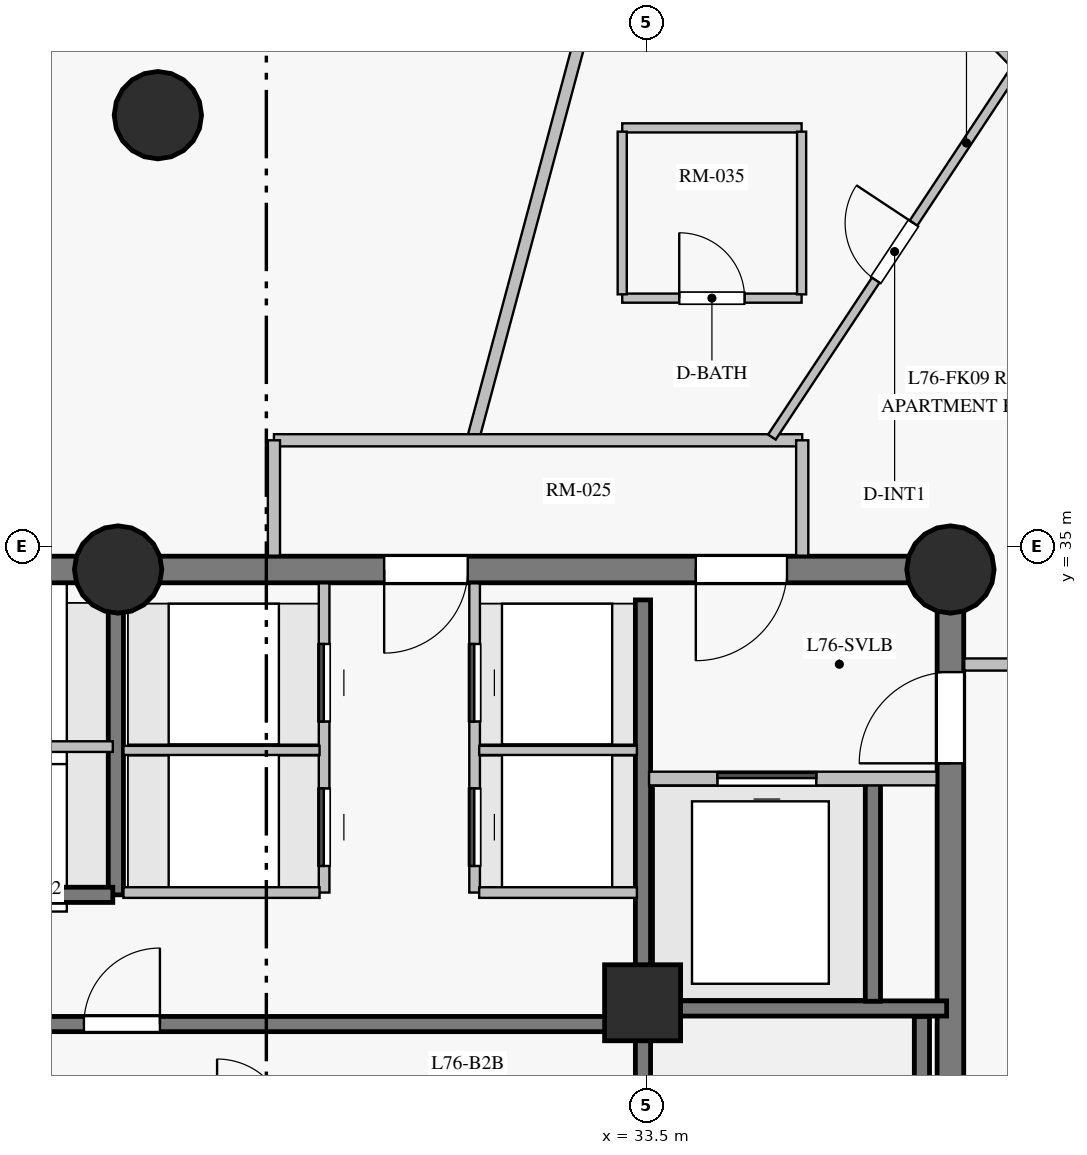
"""IFC4 building model, lengths in metres.
Left out: names, types, materials, properties, quantities, classifications, styles, units other than length and angle.
Written with IfcOpenShell. Run it as: python <this file> out.ifc"""

import sys

from ifc_helpers import new_model, si_unit, direction, frame, frame_2d, origin, origin_with_axes, origin_2d, place, context, subcontext, project, spatial, rectangle, circle, extrude, source, transform, mapped, element, fill, save


model = new_model("IFC4")
c1 = context("Model", 3, precision=1e-05, world=origin(), true_north=direction((0.0, 1.0)))
c2 = subcontext(c1, "Body", "Model", "MODEL_VIEW")
j1 = project(units=[si_unit("LENGTHUNIT", "METRE"), si_unit("PLANEANGLEUNIT", "RADIAN")], contexts=[c1])
p1 = place(None, origin())
s1 = spatial("IfcSite", under=j1, at=p1, CompositionType="ELEMENT")
p2 = place(p1, origin())
s2 = spatial("IfcBuilding", under=s1, at=p2, CompositionType="ELEMENT")
p3 = place(p2, frame((0.0, 0.0, 256.55)))
s3 = spatial("IfcBuildingStorey", under=s2, at=p3, CompositionType="ELEMENT", Elevation=256.55)
p4 = place(p3, frame((37.5, 18.3, 0.0), z_axis=(0.0, 0.0, 1.0), x_axis=(0.0, 1.0, 0.0)))
e1 = element("IfcWall", 1, at=p4, inside=s3, PredefinedType="SHEAR", context=c2, shape_type="SweptSolid", body=[
    extrude(rectangle(XDim=16.4, YDim=0.35, at=frame_2d((8.2, 0.0))), origin(), (0.0, 0.0, 1.0), 2.85),
])
p5 = place(p4, frame((13.85, 0.0, 0.0)))
e2 = element("IfcOpeningElement", 2, at=p5, cuts=e1, PredefinedType="OPENING", context=c2, shape_type="SweptSolid", body=[
    extrude(rectangle(XDim=1.2, YDim=2.15, at=frame_2d((0.6, 1.075))), frame((0.0, 0.185, 0.0), z_axis=(0.0, -1.0, 0.0), x_axis=(1.0, 0.0, 0.0)), (0.0, 0.0, 1.0), 0.37),
])
p6 = place(p3, frame((37.5, 34.7, 0.0), z_axis=(0.0, 0.0, 1.0), x_axis=(-1.0, 0.0, 0.0)))
e3 = element("IfcWall", 3, at=p6, inside=s3, PredefinedType="SHEAR", context=c2, shape_type="SweptSolid", body=[
    extrude(rectangle(XDim=10.95, YDim=0.35, at=frame_2d((5.475, 0.0))), origin(), (0.0, 0.0, 1.0), 2.85),
])
p7 = place(p6, frame((2.15, 0.0, 0.0)))
e4 = element("IfcOpeningElement", 4, at=p7, cuts=e3, PredefinedType="OPENING", context=c2, shape_type="SweptSolid", body=[
    extrude(rectangle(XDim=1.2, YDim=2.15, at=frame_2d((0.6, 1.075))), frame((0.0, 0.185, 0.0), z_axis=(0.0, -1.0, 0.0), x_axis=(1.0, 0.0, 0.0)), (0.0, 0.0, 1.0), 0.37),
])
p8 = place(p6, frame((6.35, 0.0, 0.0)))
e5 = element("IfcOpeningElement", 5, at=p8, cuts=e3, PredefinedType="OPENING", context=c2, shape_type="SweptSolid", body=[
    extrude(rectangle(XDim=1.1, YDim=2.15, at=frame_2d((0.55, 1.075))), frame((0.0, 0.185, 0.0), z_axis=(0.0, -1.0, 0.0), x_axis=(1.0, 0.0, 0.0)), (0.0, 0.0, 1.0), 0.37),
])
p9 = place(p3, frame((26.55, 34.7, 0.0), z_axis=(0.0, 0.0, 1.0), x_axis=(-1.0, 0.0, 0.0)))
e6 = element("IfcWall", 6, at=p9, inside=s3, PredefinedType="SHEAR", context=c2, shape_type="SweptSolid", body=[
    extrude(rectangle(XDim=7.05, YDim=0.35, at=frame_2d((3.525, 0.0))), origin(), (0.0, 0.0, 1.0), 2.85),
])
m1 = source(origin_with_axes(), c2, "Body", "SweptSolid", [
    extrude(circle(Radius=0.575, at=origin_2d()), origin(), (0.0, 0.0, 1.0), 3.05),
])
for number, where, z_axis, x_axis in (
    (7, (26.55, 34.7, 0.0), (0.0, 0.0, 1.0), (1.0, 0.0, 0.0)),
    (8, (37.5, 34.7, 0.0), (0.0, 0.0, 1.0), (1.0, 0.0, 0.0)),
):
    element("IfcColumn", number, at=place(p3, frame(where, z_axis=z_axis, x_axis=x_axis)), inside=s3, PredefinedType="COLUMN", context=c2, shape_type="MappedRepresentation", body=[
        mapped(m1, transform((0.0, 0.0, 0.0), scale=1.0)),
    ])
m2 = source(origin_with_axes(), c2, "Body", "SweptSolid", [
    extrude(rectangle(XDim=1.0, YDim=1.0, at=origin_2d()), origin(), (0.0, 0.0, 1.0), 3.05),
])
p10 = place(p3, frame((33.45, 29.0, 0.0), z_axis=(0.0, 0.0, 1.0), x_axis=(1.0, 0.0, 0.0)))
e9 = element("IfcColumn", 9, at=p10, inside=s3, PredefinedType="COLUMN", context=c2, shape_type="MappedRepresentation", body=[
    mapped(m2, transform((0.0, 0.0, 0.0), scale=1.0)),
])
p11 = place(p3, frame((27.073, 40.677, 0.0), z_axis=(0.0, 0.0, 1.0), x_axis=(1.0, 0.0, 0.0)))
e10 = element("IfcColumn", 10, at=p11, inside=s3, PredefinedType="COLUMN", context=c2, shape_type="MappedRepresentation", body=[
    mapped(m1, transform((0.0, 0.0, 0.0), scale=1.0)),
])
p12 = place(p3, frame((41.9, 37.822, 0.0), z_axis=(0.0, 0.0, 1.0), x_axis=(-0.698260952417, 0.715843308504, 0.0)))
e11 = element("IfcWall", 11, at=p12, inside=s3, PredefinedType="SOLIDWALL", context=c2, shape_type="SweptSolid", body=[
    extrude(rectangle(XDim=10.72, YDim=0.28, at=frame_2d((5.36, 0.0))), origin(), (0.0, 0.0, 1.0), 2.85),
])
p13 = place(p12, frame((1.723, 0.0, 0.85)))
e12 = element("IfcOpeningElement", 12, at=p13, cuts=e11, PredefinedType="OPENING", context=c2, shape_type="SweptSolid", body=[
    extrude(rectangle(XDim=1.6, YDim=1.6, at=frame_2d((0.8, 0.8))), frame((0.0, 0.15, 0.0), z_axis=(0.0, -1.0, 0.0), x_axis=(1.0, 0.0, 0.0)), (0.0, 0.0, 1.0), 0.3),
])
p14 = place(p12, frame((7.003, 0.0, 0.85)))
e13 = element("IfcOpeningElement", 13, at=p14, cuts=e11, PredefinedType="OPENING", context=c2, shape_type="SweptSolid", body=[
    extrude(rectangle(XDim=1.6, YDim=1.6, at=frame_2d((0.8, 0.8))), frame((0.0, 0.15, 0.0), z_axis=(0.0, -1.0, 0.0), x_axis=(1.0, 0.0, 0.0)), (0.0, 0.0, 1.0), 0.3),
])
p15 = place(p3, frame((33.455, 18.7, 0.0), z_axis=(0.0, 0.0, 1.0), x_axis=(0.0, 1.0, 0.0)))
e14 = element("IfcWall", 14, at=p15, inside=s3, PredefinedType="SHEAR", context=c2, shape_type="SweptSolid", body=[
    extrude(rectangle(XDim=15.6, YDim=0.2, at=frame_2d((7.8, 0.0))), origin(), (0.0, 0.0, 1.0), 2.85),
])
p16 = place(p15, frame((2.75, 0.0, 0.0)))
e15 = element("IfcOpeningElement", 15, at=p16, cuts=e14, PredefinedType="OPENING", context=c2, shape_type="SweptSolid", body=[
    extrude(rectangle(XDim=1.15, YDim=2.15, at=frame_2d((0.575, 1.075))), frame((0.0, 0.11, 0.0), z_axis=(0.0, -1.0, 0.0), x_axis=(1.0, 0.0, 0.0)), (0.0, 0.0, 1.0), 0.22),
])
p17 = place(p15, frame((0.55, 0.0, 0.0)))
e16 = element("IfcOpeningElement", 16, at=p17, cuts=e14, PredefinedType="OPENING", context=c2, shape_type="SweptSolid", body=[
    extrude(rectangle(XDim=0.94, YDim=2.1, at=frame_2d((0.47, 1.05))), frame((0.0, 0.11, 0.0), z_axis=(0.0, -1.0, 0.0), x_axis=(1.0, 0.0, 0.0)), (0.0, 0.0, 1.0), 0.22),
])
p18 = place(p3, frame((23.7, 28.72, 0.0), z_axis=(0.0, 0.0, 1.0), x_axis=(1.0, 0.0, 0.0)))
e17 = element("IfcWall", 17, at=p18, inside=s3, PredefinedType="SHEAR", context=c2, shape_type="SweptSolid", body=[
    extrude(rectangle(XDim=9.6, YDim=0.2, at=frame_2d((4.8, 0.0))), origin(), (0.0, 0.0, 1.0), 2.85),
])
p19 = place(p18, frame((2.4, 0.0, 0.0)))
e18 = element("IfcOpeningElement", 18, at=p19, cuts=e17, PredefinedType="OPENING", context=c2, shape_type="SweptSolid", body=[
    extrude(rectangle(XDim=1.0, YDim=2.15, at=frame_2d((0.5, 1.075))), frame((0.0, 0.11, 0.0), z_axis=(0.0, -1.0, 0.0), x_axis=(1.0, 0.0, 0.0)), (0.0, 0.0, 1.0), 0.22),
])
p20 = place(p3, frame((37.125, 21.32, 0.0), z_axis=(0.0, 0.0, 1.0), x_axis=(0.0, 1.0, 0.0)))
e19 = element("IfcWall", 19, at=p20, inside=s3, PredefinedType="SHEAR", context=c2, shape_type="SweptSolid", body=[
    extrude(rectangle(XDim=7.5, YDim=0.2, at=frame_2d((3.75, 0.0))), origin(), (0.0, 0.0, 1.0), 2.85),
])
p21 = place(p3, frame((33.455, 28.925, 0.0), z_axis=(0.0, 0.0, 1.0), x_axis=(1.0, 0.0, 0.0)))
e20 = element("IfcWall", 20, at=p21, inside=s3, PredefinedType="SHEAR", context=c2, shape_type="SweptSolid", body=[
    extrude(rectangle(XDim=3.995, YDim=0.2, at=frame_2d((1.998, 0.0))), origin(), (0.0, 0.0, 1.0), 2.85),
])
p22 = place(p3, frame((26.52, 30.42, 0.0), z_axis=(0.0, 0.0, 1.0), x_axis=(0.0, 1.0, 0.0)))
e21 = element("IfcWall", 21, at=p22, inside=s3, PredefinedType="SHEAR", context=c2, shape_type="SweptSolid", body=[
    extrude(rectangle(XDim=3.86, YDim=0.2, at=frame_2d((1.93, 0.0))), origin(), (0.0, 0.0, 1.0), 2.85),
])
p23 = place(p3, frame((36.48, 29.02, 0.0), z_axis=(0.0, 0.0, 1.0), x_axis=(0.0, 1.0, 0.0)))
e22 = element("IfcWall", 22, at=p23, inside=s3, PredefinedType="SHEAR", context=c2, shape_type="SweptSolid", body=[
    extrude(rectangle(XDim=2.86, YDim=0.2, at=frame_2d((1.43, 0.0))), origin(), (0.0, 0.0, 1.0), 2.85),
])
p24 = place(p3, frame((23.7, 30.42, 0.0), z_axis=(0.0, 0.0, 1.0), x_axis=(1.0, 0.0, 0.0)))
e23 = element("IfcWall", 23, at=p24, inside=s3, PredefinedType="SHEAR", context=c2, shape_type="SweptSolid", body=[
    extrude(rectangle(XDim=2.78, YDim=0.2, at=frame_2d((1.39, 0.0))), origin(), (0.0, 0.0, 1.0), 2.85),
])
p25 = place(p3, frame((31.207, 36.371, 0.0), z_axis=(0.0, 0.0, 1.0), x_axis=(0.258815637699, 0.965926739294, 0.0)))
e24 = element("IfcWall", 24, at=p25, inside=s3, PredefinedType="PARTITIONING", context=c2, shape_type="SweptSolid", body=[
    extrude(rectangle(XDim=9.408, YDim=0.16, at=frame_2d((4.704, 0.0))), origin(), (0.0, 0.0, 1.0), 2.85),
])
p26 = place(p3, frame((28.6, 36.4, 0.0), z_axis=(0.0, 0.0, 1.0), x_axis=(1.0, 0.0, 0.0)))
e25 = element("IfcWall", 25, at=p26, inside=s3, PredefinedType="PARTITIONING", context=c2, shape_type="SweptSolid", body=[
    extrude(rectangle(XDim=6.95, YDim=0.16, at=frame_2d((3.475, 0.0))), origin(), (0.0, 0.0, 1.0), 2.45),
])
p27 = place(p3, frame((35.151, 36.442, 0.0), z_axis=(0.0, 0.0, 1.0), x_axis=(0.551852093065, 0.833942004806, 0.0)))
e26 = element("IfcWall", 26, at=p27, inside=s3, PredefinedType="PARTITIONING", context=c2, shape_type="SweptSolid", body=[
    extrude(rectangle(XDim=5.902, YDim=0.12, at=frame_2d((2.951, 0.0))), origin(), (0.0, 0.0, 1.0), 2.85),
])
p28 = place(p27, frame((2.476, 0.0, 0.0)))
e27 = element("IfcOpeningElement", 27, at=p28, cuts=e26, PredefinedType="OPENING", context=c2, shape_type="SweptSolid", body=[
    extrude(rectangle(XDim=0.9, YDim=2.1, at=frame_2d((0.45, 1.05))), frame((0.0, 0.07, 0.0), z_axis=(0.0, -1.0, 0.0), x_axis=(1.0, 0.0, 0.0)), (0.0, 0.0, 1.0), 0.14),
])
p29 = place(p3, frame((37.682, 33.45, 0.0), z_axis=(0.0, 0.0, 1.0), x_axis=(1.0, 0.0, 0.0)))
e28 = element("IfcWall", 28, at=p29, inside=s3, PredefinedType="PARTITIONING", context=c2, shape_type="SweptSolid", body=[
    extrude(rectangle(XDim=4.118, YDim=0.16, at=frame_2d((2.059, 0.0))), origin(), (0.0, 0.0, 1.0), 2.85),
])
p30 = place(p29, frame((0.733, 0.0, 0.0)))
e29 = element("IfcOpeningElement", 29, at=p30, cuts=e28, PredefinedType="OPENING", context=c2, shape_type="SweptSolid", body=[
    extrude(rectangle(XDim=0.96, YDim=2.15, at=frame_2d((0.48, 1.075))), frame((0.0, 0.09, 0.0), z_axis=(0.0, -1.0, 0.0), x_axis=(1.0, 0.0, 0.0)), (0.0, 0.0, 1.0), 0.18),
])
p31 = place(p3, frame((29.26, 30.45, 0.0), z_axis=(0.0, 0.0, 1.0), x_axis=(0.0, 1.0, 0.0)))
e30 = element("IfcWall", 30, at=p31, inside=s3, PredefinedType="PARTITIONING", context=c2, shape_type="SweptSolid", body=[
    extrude(rectangle(XDim=4.068, YDim=0.14, at=frame_2d((2.034, 0.0))), origin(), (0.0, 0.0, 1.0), 2.85),
])
p32 = place(p31, frame((0.35, 0.0, 0.0)))
e31 = element("IfcOpeningElement", 31, at=p32, cuts=e30, PredefinedType="OPENING", context=c2, shape_type="SweptSolid", body=[
    extrude(rectangle(XDim=1.02, YDim=2.15, at=frame_2d((0.51, 1.075))), frame((0.0, 0.08, 0.0), z_axis=(0.0, -1.0, 0.0), x_axis=(1.0, 0.0, 0.0)), (0.0, 0.0, 1.0), 0.16),
])
p33 = place(p31, frame((2.25, 0.0, 0.0)))
e32 = element("IfcOpeningElement", 32, at=p33, cuts=e30, PredefinedType="OPENING", context=c2, shape_type="SweptSolid", body=[
    extrude(rectangle(XDim=1.02, YDim=2.15, at=frame_2d((0.51, 1.075))), frame((0.0, 0.08, 0.0), z_axis=(0.0, -1.0, 0.0), x_axis=(1.0, 0.0, 0.0)), (0.0, 0.0, 1.0), 0.16),
])
p34 = place(p3, frame((31.24, 30.45, 0.0), z_axis=(0.0, 0.0, 1.0), x_axis=(0.0, 1.0, 0.0)))
e33 = element("IfcWall", 33, at=p34, inside=s3, PredefinedType="PARTITIONING", context=c2, shape_type="SweptSolid", body=[
    extrude(rectangle(XDim=4.068, YDim=0.14, at=frame_2d((2.034, 0.0))), origin(), (0.0, 0.0, 1.0), 2.85),
])
p35 = place(p34, frame((0.35, 0.0, 0.0)))
e34 = element("IfcOpeningElement", 34, at=p35, cuts=e33, PredefinedType="OPENING", context=c2, shape_type="SweptSolid", body=[
    extrude(rectangle(XDim=1.02, YDim=2.15, at=frame_2d((0.51, 1.075))), frame((0.0, 0.08, 0.0), z_axis=(0.0, -1.0, 0.0), x_axis=(1.0, 0.0, 0.0)), (0.0, 0.0, 1.0), 0.16),
])
p36 = place(p34, frame((2.25, 0.0, 0.0)))
e35 = element("IfcOpeningElement", 35, at=p36, cuts=e33, PredefinedType="OPENING", context=c2, shape_type="SweptSolid", body=[
    extrude(rectangle(XDim=1.02, YDim=2.15, at=frame_2d((0.51, 1.075))), frame((0.0, 0.08, 0.0), z_axis=(0.0, -1.0, 0.0), x_axis=(1.0, 0.0, 0.0)), (0.0, 0.0, 1.0), 0.16),
])
p37 = place(p3, frame((33.535, 31.95, 0.0), z_axis=(0.0, 0.0, 1.0), x_axis=(1.0, 0.0, 0.0)))
e36 = element("IfcWall", 36, at=p37, inside=s3, PredefinedType="PARTITIONING", context=c2, shape_type="SweptSolid", body=[
    extrude(rectangle(XDim=3.784, YDim=0.18, at=frame_2d((1.892, 0.0))), origin(), (0.0, 0.0, 1.0), 2.85),
])
p38 = place(p37, frame((0.9, 0.0, 0.0)))
e37 = element("IfcOpeningElement", 37, at=p38, cuts=e36, PredefinedType="OPENING", context=c2, shape_type="SweptSolid", body=[
    extrude(rectangle(XDim=1.3, YDim=2.2, at=frame_2d((0.65, 1.1))), frame((0.0, 0.1, 0.0), z_axis=(0.0, -1.0, 0.0), x_axis=(1.0, 0.0, 0.0)), (0.0, 0.0, 1.0), 0.2),
])
p39 = place(p3, frame((23.652, 32.37, 0.0), z_axis=(0.0, 0.0, 1.0), x_axis=(1.0, 0.0, 0.0)))
e38 = element("IfcWall", 38, at=p39, inside=s3, PredefinedType="PARTITIONING", context=c2, shape_type="SweptSolid", body=[
    extrude(rectangle(XDim=2.828, YDim=0.14, at=frame_2d((1.414, 0.0))), origin(), (0.0, 0.0, 1.0), 2.85),
])
p40 = place(p3, frame((26.62, 30.45, 0.0), z_axis=(0.0, 0.0, 1.0), x_axis=(1.0, 0.0, 0.0)))
e39 = element("IfcWall", 39, at=p40, inside=s3, PredefinedType="PARTITIONING", context=c2, shape_type="SweptSolid", body=[
    extrude(rectangle(XDim=2.58, YDim=0.14, at=frame_2d((1.29, 0.0))), origin(), (0.0, 0.0, 1.0), 2.85),
])
p41 = place(p3, frame((26.62, 32.32, 0.0), z_axis=(0.0, 0.0, 1.0), x_axis=(1.0, 0.0, 0.0)))
e40 = element("IfcWall", 40, at=p41, inside=s3, PredefinedType="PARTITIONING", context=c2, shape_type="SweptSolid", body=[
    extrude(rectangle(XDim=2.58, YDim=0.12, at=frame_2d((1.29, 0.0))), origin(), (0.0, 0.0, 1.0), 2.85),
])
p42 = place(p3, frame((33.182, 38.27, 0.0), z_axis=(0.0, 0.0, 1.0), x_axis=(1.0, 0.0, 0.0)))
e41 = element("IfcWall", 41, at=p42, inside=s3, PredefinedType="PARTITIONING", context=c2, shape_type="SweptSolid", body=[
    extrude(rectangle(XDim=2.36, YDim=0.12, at=frame_2d((1.18, 0.0))), origin(), (0.0, 0.0, 1.0), 2.3),
])
p43 = place(p42, frame((0.75, 0.0, 0.0)))
e42 = element("IfcOpeningElement", 42, at=p43, cuts=e41, PredefinedType="OPENING", context=c2, shape_type="SweptSolid", body=[
    extrude(rectangle(XDim=0.86, YDim=2.1, at=frame_2d((0.43, 1.05))), frame((0.0, 0.07, 0.0), z_axis=(0.0, -1.0, 0.0), x_axis=(1.0, 0.0, 0.0)), (0.0, 0.0, 1.0), 0.14),
])
p44 = place(p3, frame((35.542, 40.51, 0.0), z_axis=(0.0, 0.0, 1.0), x_axis=(-1.0, 0.0, 0.0)))
e43 = element("IfcWall", 43, at=p44, inside=s3, PredefinedType="PARTITIONING", context=c2, shape_type="SweptSolid", body=[
    extrude(rectangle(XDim=2.36, YDim=0.12, at=frame_2d((1.18, 0.0))), origin(), (0.0, 0.0, 1.0), 2.85),
])
for number, where, z_axis, x_axis in (
    (44, (35.542, 38.32, 0.0), (0.0, 0.0, 1.0), (0.0, 1.0, 0.0)),
    (45, (33.182, 40.46, 0.0), (0.0, 0.0, 1.0), (0.0, -1.0, 0.0)),
):
    element("IfcWall", number, at=place(p3, frame(where, z_axis=z_axis, x_axis=x_axis)), inside=s3, PredefinedType="PARTITIONING", context=c2, shape_type="SweptSolid", body=[
        extrude(rectangle(XDim=2.14, YDim=0.12, at=frame_2d((1.07, 0.0))), origin(), (0.0, 0.0, 1.0), 2.85),
    ])
p45 = place(p3, frame((31.3, 30.45, 0.0), z_axis=(0.0, 0.0, 1.0), x_axis=(1.0, 0.0, 0.0)))
e46 = element("IfcWall", 46, at=p45, inside=s3, PredefinedType="PARTITIONING", context=c2, shape_type="SweptSolid", body=[
    extrude(rectangle(XDim=2.075, YDim=0.14, at=frame_2d((1.038, 0.0))), origin(), (0.0, 0.0, 1.0), 2.85),
])
p46 = place(p3, frame((31.3, 32.32, 0.0), z_axis=(0.0, 0.0, 1.0), x_axis=(1.0, 0.0, 0.0)))
e47 = element("IfcWall", 47, at=p46, inside=s3, PredefinedType="PARTITIONING", context=c2, shape_type="SweptSolid", body=[
    extrude(rectangle(XDim=2.075, YDim=0.12, at=frame_2d((1.038, 0.0))), origin(), (0.0, 0.0, 1.0), 2.85),
])
for number, where, z_axis, x_axis in (
    (48, (28.6, 34.882, 0.0), (0.0, 0.0, 1.0), (0.0, 1.0, 0.0)),
    (49, (35.55, 36.4, 0.0), (0.0, 0.0, 1.0), (0.0, -1.0, 0.0)),
):
    element("IfcWall", number, at=place(p3, frame(where, z_axis=z_axis, x_axis=x_axis)), inside=s3, PredefinedType="PARTITIONING", context=c2, shape_type="SweptSolid", body=[
        extrude(rectangle(XDim=1.518, YDim=0.16, at=frame_2d((0.759, 0.0))), origin(), (0.0, 0.0, 1.0), 2.85),
    ])
m3 = source(origin_with_axes(), c2, "Body", "SweptSolid", [
    extrude(rectangle(XDim=1.2, YDim=2.15, at=frame_2d((0.6, 1.075))), frame((0.0, 0.025, 0.0), z_axis=(0.0, -1.0, 0.0), x_axis=(1.0, 0.0, 0.0)), (0.0, 0.0, 1.0), 0.05),
])
p47 = place(p5, origin())
e50 = element("IfcDoor", 50, at=p47, inside=s3, OperationType="SINGLE_SWING_LEFT", PredefinedType="DOOR", context=c2, shape_type="MappedRepresentation", body=[
    mapped(m3, transform((0.0, 0.0, 0.0), scale=1.0)),
])
fill(e2, e50)
p48 = place(p7, origin())
e51 = element("IfcDoor", 51, at=p48, inside=s3, OperationType="SINGLE_SWING_RIGHT", PredefinedType="DOOR", context=c2, shape_type="MappedRepresentation", body=[
    mapped(m3, transform((0.0, 0.0, 0.0), scale=1.0)),
])
fill(e4, e51)
m4 = source(origin_with_axes(), c2, "Body", "SweptSolid", [
    extrude(rectangle(XDim=1.3, YDim=2.2, at=frame_2d((0.65, 1.1))), frame((0.0, 0.025, 0.0), z_axis=(0.0, -1.0, 0.0), x_axis=(1.0, 0.0, 0.0)), (0.0, 0.0, 1.0), 0.05),
])
p49 = place(p38, origin())
e52 = element("IfcDoor", 52, at=p49, inside=s3, OperationType="SLIDING_TO_LEFT", PredefinedType="DOOR", context=c2, shape_type="MappedRepresentation", body=[
    mapped(m4, transform((0.0, 0.0, 0.0), scale=1.0)),
])
fill(e37, e52)
m5 = source(origin_with_axes(), c2, "Body", "SweptSolid", [
    extrude(rectangle(XDim=1.0, YDim=2.15, at=frame_2d((0.5, 1.075))), frame((0.0, 0.025, 0.0), z_axis=(0.0, -1.0, 0.0), x_axis=(1.0, 0.0, 0.0)), (0.0, 0.0, 1.0), 0.05),
])
p50 = place(p19, origin())
e53 = element("IfcDoor", 53, at=p50, inside=s3, OperationType="SINGLE_SWING_RIGHT", PredefinedType="DOOR", context=c2, shape_type="MappedRepresentation", body=[
    mapped(m5, transform((0.0, 0.0, 0.0), scale=1.0)),
])
fill(e18, e53)
m6 = source(origin_with_axes(), c2, "Body", "SweptSolid", [
    extrude(rectangle(XDim=1.1, YDim=2.15, at=frame_2d((0.55, 1.075))), frame((0.0, 0.025, 0.0), z_axis=(0.0, -1.0, 0.0), x_axis=(1.0, 0.0, 0.0)), (0.0, 0.0, 1.0), 0.05),
])
p51 = place(p8, origin())
e54 = element("IfcDoor", 54, at=p51, inside=s3, OperationType="SINGLE_SWING_RIGHT", PredefinedType="DOOR", context=c2, shape_type="MappedRepresentation", body=[
    mapped(m6, transform((0.0, 0.0, 0.0), scale=1.0)),
])
fill(e5, e54)
m7 = source(origin_with_axes(), c2, "Body", "SweptSolid", [
    extrude(rectangle(XDim=1.02, YDim=2.15, at=frame_2d((0.51, 1.075))), frame((0.0, 0.025, 0.0), z_axis=(0.0, -1.0, 0.0), x_axis=(1.0, 0.0, 0.0)), (0.0, 0.0, 1.0), 0.05),
])
p52 = place(p32, origin())
e55 = element("IfcDoor", 55, at=p52, inside=s3, OperationType="SLIDING_TO_LEFT", PredefinedType="DOOR", context=c2, shape_type="MappedRepresentation", body=[
    mapped(m7, transform((0.0, 0.0, 0.0), scale=1.0)),
])
fill(e31, e55)
p53 = place(p33, origin())
e56 = element("IfcDoor", 56, at=p53, inside=s3, OperationType="SLIDING_TO_LEFT", PredefinedType="DOOR", context=c2, shape_type="MappedRepresentation", body=[
    mapped(m7, transform((0.0, 0.0, 0.0), scale=1.0)),
])
fill(e32, e56)
p54 = place(p35, origin())
e57 = element("IfcDoor", 57, at=p54, inside=s3, OperationType="SLIDING_TO_LEFT", PredefinedType="DOOR", context=c2, shape_type="MappedRepresentation", body=[
    mapped(m7, transform((0.0, 0.0, 0.0), scale=1.0)),
])
fill(e34, e57)
p55 = place(p36, origin())
e58 = element("IfcDoor", 58, at=p55, inside=s3, OperationType="SLIDING_TO_LEFT", PredefinedType="DOOR", context=c2, shape_type="MappedRepresentation", body=[
    mapped(m7, transform((0.0, 0.0, 0.0), scale=1.0)),
])
fill(e35, e58)
m8 = source(origin_with_axes(), c2, "Body", "SweptSolid", [
    extrude(rectangle(XDim=0.86, YDim=2.1, at=frame_2d((0.43, 1.05))), frame((0.0, 0.025, 0.0), z_axis=(0.0, -1.0, 0.0), x_axis=(1.0, 0.0, 0.0)), (0.0, 0.0, 1.0), 0.05),
])
p56 = place(p43, origin())
e59 = element("IfcDoor", 59, at=p56, inside=s3, OperationType="SINGLE_SWING_LEFT", PredefinedType="DOOR", context=c2, shape_type="MappedRepresentation", body=[
    mapped(m8, transform((0.0, 0.0, 0.0), scale=1.0)),
])
fill(e42, e59)
m9 = source(origin_with_axes(), c2, "Body", "SweptSolid", [
    extrude(rectangle(XDim=0.9, YDim=2.1, at=frame_2d((0.45, 1.05))), frame((0.0, 0.025, 0.0), z_axis=(0.0, -1.0, 0.0), x_axis=(1.0, 0.0, 0.0)), (0.0, 0.0, 1.0), 0.05),
])
p57 = place(p28, origin())
e60 = element("IfcDoor", 60, at=p57, inside=s3, OperationType="SINGLE_SWING_RIGHT", PredefinedType="DOOR", context=c2, shape_type="MappedRepresentation", body=[
    mapped(m9, transform((0.0, 0.0, 0.0), scale=1.0)),
])
fill(e27, e60)
save(model, sys.argv[1])
